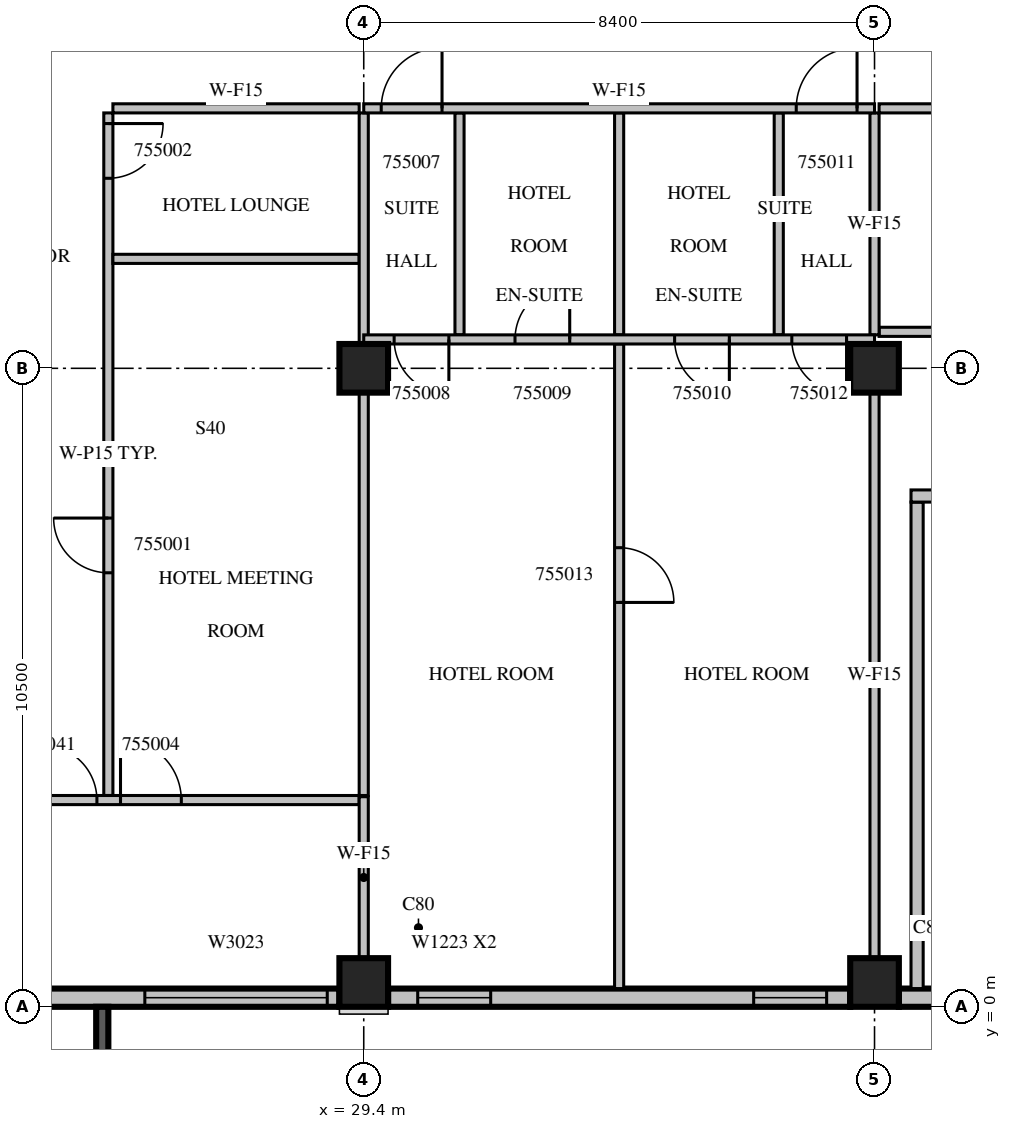
"""IFC4 building model, lengths in metres.
Left out: names, types, materials, properties, quantities, classifications, styles, units other than length and angle.
Written with IfcOpenShell. Run it as: python <this file> out.ifc"""

import sys

from ifc_helpers import new_model, si_unit, direction, frame, frame_2d, origin, origin_2d, place, context, subcontext, project, spatial, rectangle, extrude, source, transform, mapped, element, fill, save


model = new_model("IFC4")
c1 = context("Model", 3, precision=1e-05, world=origin(), true_north=direction((0.0, 1.0)))
c2 = subcontext(c1, "Body", "Model", "MODEL_VIEW")
j1 = project(units=[si_unit("LENGTHUNIT", "METRE"), si_unit("PLANEANGLEUNIT", "RADIAN")], contexts=[c1])
p1 = place(None, origin())
s1 = spatial("IfcSite", under=j1, at=p1, CompositionType="ELEMENT")
p2 = place(p1, origin())
s2 = spatial("IfcBuilding", under=s1, at=p2, CompositionType="ELEMENT")
p3 = place(p2, frame((0.0, 0.0, 242.4)))
s3 = spatial("IfcBuildingStorey", under=s2, at=p3, CompositionType="ELEMENT", Elevation=242.4)
m1 = source(origin(), c2, "Body", "SweptSolid", [
    extrude(rectangle(XDim=0.8, YDim=0.8, at=origin_2d()), origin(), (0.0, 0.0, 1.0), 3.8),
])
for number, where, z_axis, x_axis in (
    (1, (29.4, 0.4, 0.0), (0.0, 0.0, 1.0), (1.0, 0.0, 0.0)),
    (2, (37.8, 0.4, 0.0), (0.0, 0.0, 1.0), (1.0, 0.0, 0.0)),
    (3, (29.4, 10.5, 0.0), (0.0, 0.0, 1.0), (1.0, 0.0, 0.0)),
    (4, (37.8, 10.5, 0.0), (0.0, 0.0, 1.0), (1.0, 0.0, 0.0)),
):
    element("IfcColumn", number, at=place(p3, frame(where, z_axis=z_axis, x_axis=x_axis)), inside=s3, PredefinedType="COLUMN", context=c2, shape_type="MappedRepresentation", body=[
        mapped(m1, transform((0.0, 0.0, 0.0), scale=1.0)),
    ])
m2 = source(origin(), c2, "Body", "SweptSolid", [
    extrude(rectangle(XDim=7.6, YDim=0.3, at=frame_2d((3.8, 0.0))), origin(), (0.0, 0.0, 1.0), 3.4),
])
p4 = place(p3, frame((21.4, 0.15, 0.0), z_axis=(0.0, 0.0, 1.0), x_axis=(1.0, 0.0, 0.0)))
e5 = element("IfcWall", 5, at=p4, inside=s3, PredefinedType="STANDARD", context=c2, shape_type="MappedRepresentation", body=[
    mapped(m2, transform((0.0, 0.0, 0.0), scale=1.0)),
])
m3 = source(origin(), c2, "Body", "SweptSolid", [
    extrude(rectangle(XDim=3.0, YDim=2.3, at=frame_2d((1.5, 1.15))), frame((0.0, 0.16, 0.0), z_axis=(0.0, -1.0, 0.0), x_axis=(1.0, 0.0, 0.0)), (0.0, 0.0, 1.0), 0.32),
])
p5 = place(p4, frame((4.4, 0.0, 0.6)))
e6 = element("IfcOpeningElement", 6, at=p5, cuts=e5, PredefinedType="OPENING", context=c2, shape_type="MappedRepresentation", body=[
    mapped(m3, transform((0.0, 0.0, 0.0), scale=1.0)),
])
m4 = source(origin(), c2, "Body", "SweptSolid", [
    extrude(rectangle(XDim=1.0, YDim=2.1, at=frame_2d((0.5, 1.05))), frame((0.0, 0.16, 0.0), z_axis=(0.0, -1.0, 0.0), x_axis=(1.0, 0.0, 0.0)), (0.0, 0.0, 1.0), 0.32),
])
p6 = place(p4, frame((1.2, 0.0, 0.0)))
e7 = element("IfcOpeningElement", 7, at=p6, cuts=e5, PredefinedType="OPENING", context=c2, shape_type="MappedRepresentation", body=[
    mapped(m4, transform((0.0, 0.0, 0.0), scale=1.0)),
])
p7 = place(p3, frame((29.8, 0.15, 0.0), z_axis=(0.0, 0.0, 1.0), x_axis=(1.0, 0.0, 0.0)))
e8 = element("IfcWall", 8, at=p7, inside=s3, PredefinedType="STANDARD", context=c2, shape_type="MappedRepresentation", body=[
    mapped(m2, transform((0.0, 0.0, 0.0), scale=1.0)),
])
m5 = source(origin(), c2, "Body", "SweptSolid", [
    extrude(rectangle(XDim=1.2, YDim=2.3, at=frame_2d((0.6, 1.15))), frame((0.0, 0.16, 0.0), z_axis=(0.0, -1.0, 0.0), x_axis=(1.0, 0.0, 0.0)), (0.0, 0.0, 1.0), 0.32),
])
p8 = place(p7, frame((0.487, 0.0, 0.6)))
e9 = element("IfcOpeningElement", 9, at=p8, cuts=e8, PredefinedType="OPENING", context=c2, shape_type="MappedRepresentation", body=[
    mapped(m5, transform((0.0, 0.0, 0.0), scale=1.0)),
])
p9 = place(p7, frame((6.013, 0.0, 0.6)))
e10 = element("IfcOpeningElement", 10, at=p9, cuts=e8, PredefinedType="OPENING", context=c2, shape_type="MappedRepresentation", body=[
    mapped(m5, transform((0.0, 0.0, 0.0), scale=1.0)),
])
m6 = source(origin(), c2, "Body", "SweptSolid", [
    extrude(rectangle(XDim=2.0, YDim=0.3, at=frame_2d((1.0, 0.0))), origin(), (0.0, 0.0, 1.0), 3.4),
])
p10 = place(p3, frame((38.2, 0.15, 0.0), z_axis=(0.0, 0.0, 1.0), x_axis=(1.0, 0.0, 0.0)))
e11 = element("IfcWall", 11, at=p10, inside=s3, PredefinedType="STANDARD", context=c2, shape_type="MappedRepresentation", body=[
    mapped(m6, transform((0.0, 0.0, 0.0), scale=1.0)),
])
m7 = source(origin(), c2, "Body", "SweptSolid", [
    extrude(rectangle(XDim=3.9, YDim=0.2, at=frame_2d((1.95, 0.0))), origin(), (0.0, 0.0, 1.0), 3.39),
])
p11 = place(p3, frame((25.1, 0.0, 0.0), z_axis=(0.0, 0.0, 1.0), x_axis=(0.0, -1.0, 0.0)))
e12 = element("IfcWall", 12, at=p11, inside=s3, PredefinedType="SOLIDWALL", context=c2, shape_type="MappedRepresentation", body=[
    mapped(m7, transform((0.0, 0.0, 0.0), scale=1.0)),
])
m8 = source(origin(), c2, "Body", "SweptSolid", [
    extrude(rectangle(XDim=2.4, YDim=2.3, at=frame_2d((1.2, 1.15))), frame((0.0, 0.11, 0.0), z_axis=(0.0, -1.0, 0.0), x_axis=(1.0, 0.0, 0.0)), (0.0, 0.0, 1.0), 0.22),
])
p12 = place(p11, frame((0.75, 0.0, 0.6)))
e13 = element("IfcOpeningElement", 13, at=p12, cuts=e12, PredefinedType="OPENING", context=c2, shape_type="MappedRepresentation", body=[
    mapped(m8, transform((0.0, 0.0, 0.0), scale=1.0)),
])
m9 = source(origin(), c2, "Body", "SweptSolid", [
    extrude(rectangle(XDim=8.0, YDim=0.2, at=frame_2d((4.0, 0.0))), origin(), (0.0, 0.0, 1.0), 3.4),
])
p13 = place(p3, frame((38.5, 0.3, 0.0), z_axis=(0.0, 0.0, 1.0), x_axis=(0.0, 1.0, 0.0)))
e14 = element("IfcWall", 14, at=p13, inside=s3, PredefinedType="PARTITIONING", context=c2, shape_type="MappedRepresentation", body=[
    mapped(m9, transform((0.0, 0.0, 0.0), scale=1.0)),
])
m10 = source(origin(), c2, "Body", "SweptSolid", [
    extrude(rectangle(XDim=5.45, YDim=0.2, at=frame_2d((2.725, 0.0))), origin(), (0.0, 0.0, 1.0), 3.4),
])
p14 = place(p3, frame((38.4, 8.4, 0.0), z_axis=(0.0, 0.0, 1.0), x_axis=(1.0, 0.0, 0.0)))
e15 = element("IfcWall", 15, at=p14, inside=s3, PredefinedType="PARTITIONING", context=c2, shape_type="MappedRepresentation", body=[
    mapped(m10, transform((0.0, 0.0, 0.0), scale=1.0)),
])
m11 = source(origin(), c2, "Body", "SweptSolid", [
    extrude(rectangle(XDim=1.2, YDim=2.1, at=frame_2d((0.6, 1.05))), frame((0.0, 0.11, 0.0), z_axis=(0.0, -1.0, 0.0), x_axis=(1.0, 0.0, 0.0)), (0.0, 0.0, 1.0), 0.22),
])
p15 = place(p14, frame((0.4, 0.0, 0.0)))
e16 = element("IfcOpeningElement", 16, at=p15, cuts=e15, PredefinedType="OPENING", context=c2, shape_type="MappedRepresentation", body=[
    mapped(m11, transform((0.0, 0.0, 0.0), scale=1.0)),
])
m12 = source(origin(), c2, "Body", "SweptSolid", [
    extrude(rectangle(XDim=0.9, YDim=2.1, at=frame_2d((0.45, 1.05))), frame((0.0, 0.11, 0.0), z_axis=(0.0, -1.0, 0.0), x_axis=(1.0, 0.0, 0.0)), (0.0, 0.0, 1.0), 0.22),
])
p16 = place(p14, frame((3.25, 0.0, 0.0)))
e17 = element("IfcOpeningElement", 17, at=p16, cuts=e15, PredefinedType="OPENING", context=c2, shape_type="MappedRepresentation", body=[
    mapped(m12, transform((0.0, 0.0, 0.0), scale=1.0)),
])
m13 = source(origin(), c2, "Body", "SweptSolid", [
    extrude(rectangle(XDim=11.225, YDim=0.15, at=frame_2d((5.612, 0.0))), origin(), (0.0, 0.0, 1.0), 3.4),
])
p17 = place(p3, frame((25.2, 14.7, 0.0), z_axis=(0.0, 0.0, 1.0), x_axis=(0.0, -1.0, 0.0)))
e18 = element("IfcWall", 18, at=p17, inside=s3, PredefinedType="PARTITIONING", context=c2, shape_type="MappedRepresentation", body=[
    mapped(m13, transform((0.0, 0.0, 0.0), scale=1.0)),
])
m14 = source(origin(), c2, "Body", "SweptSolid", [
    extrude(rectangle(XDim=0.9, YDim=2.1, at=frame_2d((0.45, 1.05))), frame((0.0, 0.085, 0.0), z_axis=(0.0, -1.0, 0.0), x_axis=(1.0, 0.0, 0.0)), (0.0, 0.0, 1.0), 0.17),
])
p18 = place(p17, frame((6.662, 0.0, 0.0)))
e19 = element("IfcOpeningElement", 19, at=p18, cuts=e18, PredefinedType="OPENING", context=c2, shape_type="MappedRepresentation", body=[
    mapped(m14, transform((0.0, 0.0, 0.0), scale=1.0)),
])
p19 = place(p17, frame((0.175, 0.0, 0.0)))
e20 = element("IfcOpeningElement", 20, at=p19, cuts=e18, PredefinedType="OPENING", context=c2, shape_type="MappedRepresentation", body=[
    mapped(m14, transform((0.0, 0.0, 0.0), scale=1.0)),
])
m15 = source(origin(), c2, "Body", "SweptSolid", [
    extrude(rectangle(XDim=4.05, YDim=0.15, at=frame_2d((2.025, 0.0))), origin(), (0.0, 0.0, 1.0), 3.4),
])
for number, where, z_axis, x_axis in (
    (21, (29.325, 12.3, 0.0), (0.0, 0.0, 1.0), (-1.0, 0.0, 0.0)),
    (22, (29.325, 14.775, 0.0), (0.0, 0.0, 1.0), (-1.0, 0.0, 0.0)),
):
    element("IfcWall", number, at=place(p3, frame(where, z_axis=z_axis, x_axis=x_axis)), inside=s3, PredefinedType="PARTITIONING", context=c2, shape_type="MappedRepresentation", body=[
        mapped(m15, transform((0.0, 0.0, 0.0), scale=1.0)),
    ])
m16 = source(origin(), c2, "Body", "SweptSolid", [
    extrude(rectangle(XDim=6.626, YDim=0.15, at=frame_2d((3.313, 0.0))), origin(), (0.0, 0.0, 1.0), 3.4),
])
p20 = place(p3, frame((29.4, 3.475, 0.0), z_axis=(0.0, 0.0, 1.0), x_axis=(0.0, 1.0, 0.0)))
e23 = element("IfcWall", 23, at=p20, inside=s3, PredefinedType="PARTITIONING", context=c2, shape_type="MappedRepresentation", body=[
    mapped(m16, transform((0.0, 0.0, 0.0), scale=1.0)),
])
m17 = source(origin(), c2, "Body", "SweptSolid", [
    extrude(rectangle(XDim=3.801, YDim=0.15, at=frame_2d((1.901, 0.0))), origin(), (0.0, 0.0, 1.0), 3.4),
])
p21 = place(p3, frame((29.4, 10.899, 0.0), z_axis=(0.0, 0.0, 1.0), x_axis=(0.0, 1.0, 0.0)))
e24 = element("IfcWall", 24, at=p21, inside=s3, PredefinedType="PARTITIONING", context=c2, shape_type="MappedRepresentation", body=[
    mapped(m17, transform((0.0, 0.0, 0.0), scale=1.0)),
])
m18 = source(origin(), c2, "Body", "SweptSolid", [
    extrude(rectangle(XDim=7.525, YDim=0.15, at=frame_2d((3.763, 0.0))), origin(), (0.0, 0.0, 1.0), 3.4),
])
p22 = place(p3, frame((21.8, 3.4, 0.0), z_axis=(0.0, 0.0, 1.0), x_axis=(1.0, 0.0, 0.0)))
e25 = element("IfcWall", 25, at=p22, inside=s3, PredefinedType="PARTITIONING", context=c2, shape_type="MappedRepresentation", body=[
    mapped(m18, transform((0.0, 0.0, 0.0), scale=1.0)),
])
m19 = source(origin(), c2, "Body", "SweptSolid", [
    extrude(rectangle(XDim=1.0, YDim=2.1, at=frame_2d((0.5, 1.05))), frame((0.0, 0.085, 0.0), z_axis=(0.0, -1.0, 0.0), x_axis=(1.0, 0.0, 0.0)), (0.0, 0.0, 1.0), 0.17),
])
p23 = place(p22, frame((3.6, 0.0, 0.0)))
e26 = element("IfcOpeningElement", 26, at=p23, cuts=e25, PredefinedType="OPENING", context=c2, shape_type="MappedRepresentation", body=[
    mapped(m19, transform((0.0, 0.0, 0.0), scale=1.0)),
])
p24 = place(p22, frame((2.312, 0.0, 0.0)))
e27 = element("IfcOpeningElement", 27, at=p24, cuts=e25, PredefinedType="OPENING", context=c2, shape_type="MappedRepresentation", body=[
    mapped(m14, transform((0.0, 0.0, 0.0), scale=1.0)),
])
m20 = source(origin(), c2, "Body", "SweptSolid", [
    extrude(rectangle(XDim=6.45, YDim=0.15, at=frame_2d((3.225, 0.0))), origin(), (0.0, 0.0, 1.0), 3.4),
])
p25 = place(p3, frame((37.875, 11.1, 0.0), z_axis=(0.0, 0.0, 1.0), x_axis=(1.0, 0.0, 0.0)))
e28 = element("IfcWall", 28, at=p25, inside=s3, PredefinedType="PARTITIONING", context=c2, shape_type="MappedRepresentation", body=[
    mapped(m20, transform((0.0, 0.0, 0.0), scale=1.0)),
])
p26 = place(p3, frame((44.325, 14.775, 0.0), z_axis=(0.0, 0.0, 1.0), x_axis=(-1.0, 0.0, 0.0)))
e29 = element("IfcWall", 29, at=p26, inside=s3, PredefinedType="PARTITIONING", context=c2, shape_type="MappedRepresentation", body=[
    mapped(m20, transform((0.0, 0.0, 0.0), scale=1.0)),
])
p27 = place(p26, frame((2.812, 0.0, 0.0)))
e30 = element("IfcOpeningElement", 30, at=p27, cuts=e29, PredefinedType="OPENING", context=c2, shape_type="MappedRepresentation", body=[
    mapped(m14, transform((0.0, 0.0, 0.0), scale=1.0)),
])
p28 = place(p3, frame((33.6, 0.3, 0.0), z_axis=(0.0, 0.0, 1.0), x_axis=(0.0, 1.0, 0.0)))
e31 = element("IfcWall", 31, at=p28, inside=s3, PredefinedType="PARTITIONING", context=c2, shape_type="SweptSolid", body=[
    extrude(rectangle(XDim=10.6, YDim=0.15, at=frame_2d((5.3, 0.0))), origin(), (0.0, 0.0, 1.0), 3.4),
])
p29 = place(p28, frame((6.35, 0.0, 0.0)))
e32 = element("IfcOpeningElement", 32, at=p29, cuts=e31, PredefinedType="OPENING", context=c2, shape_type="MappedRepresentation", body=[
    mapped(m14, transform((0.0, 0.0, 0.0), scale=1.0)),
])
m21 = source(origin(), c2, "Body", "SweptSolid", [
    extrude(rectangle(XDim=3.65, YDim=0.15, at=frame_2d((1.825, 0.0))), origin(), (0.0, 0.0, 1.0), 3.4),
])
for number, where, z_axis, x_axis in (
    (33, (30.975, 11.05, 0.0), (0.0, 0.0, 1.0), (0.0, 1.0, 0.0)),
    (34, (33.6, 11.05, 0.0), (0.0, 0.0, 1.0), (0.0, 1.0, 0.0)),
    (35, (36.225, 11.05, 0.0), (0.0, 0.0, 1.0), (0.0, 1.0, 0.0)),
):
    element("IfcWall", number, at=place(p3, frame(where, z_axis=z_axis, x_axis=x_axis)), inside=s3, PredefinedType="PARTITIONING", context=c2, shape_type="MappedRepresentation", body=[
        mapped(m21, transform((0.0, 0.0, 0.0), scale=1.0)),
    ])
m22 = source(origin(), c2, "Body", "SweptSolid", [
    extrude(rectangle(XDim=2.656, YDim=0.15, at=frame_2d((1.328, 0.0))), origin(), (0.0, 0.0, 1.0), 3.4),
])
p30 = place(p3, frame((29.4, 0.799, 0.0), z_axis=(0.0, 0.0, 1.0), x_axis=(0.0, 1.0, 0.0)))
e36 = element("IfcWall", 36, at=p30, inside=s3, PredefinedType="PARTITIONING", context=c2, shape_type="MappedRepresentation", body=[
    mapped(m22, transform((0.0, 0.0, 0.0), scale=1.0)),
])
m23 = source(origin(), c2, "Body", "SweptSolid", [
    extrude(rectangle(XDim=9.302, YDim=0.15, at=frame_2d((4.651, 0.0))), origin(), (0.0, 0.0, 1.0), 3.4),
])
p31 = place(p3, frame((37.8, 0.799, 0.0), z_axis=(0.0, 0.0, 1.0), x_axis=(0.0, 1.0, 0.0)))
e37 = element("IfcWall", 37, at=p31, inside=s3, PredefinedType="PARTITIONING", context=c2, shape_type="MappedRepresentation", body=[
    mapped(m23, transform((0.0, 0.0, 0.0), scale=1.0)),
])
p32 = place(p3, frame((37.8, 11.05, 0.0), z_axis=(0.0, 0.0, 1.0), x_axis=(0.0, 1.0, 0.0)))
e38 = element("IfcWall", 38, at=p32, inside=s3, PredefinedType="PARTITIONING", context=c2, shape_type="MappedRepresentation", body=[
    mapped(m21, transform((0.0, 0.0, 0.0), scale=1.0)),
])
m24 = source(origin(), c2, "Body", "SweptSolid", [
    extrude(rectangle(XDim=8.4, YDim=0.15, at=frame_2d((4.2, 0.0))), origin(), (0.0, 0.0, 1.0), 3.4),
])
p33 = place(p3, frame((37.8, 10.975, 0.0), z_axis=(0.0, 0.0, 1.0), x_axis=(-1.0, 0.0, 0.0)))
e39 = element("IfcWall", 39, at=p33, inside=s3, PredefinedType="PARTITIONING", context=c2, shape_type="MappedRepresentation", body=[
    mapped(m24, transform((0.0, 0.0, 0.0), scale=1.0)),
])
p34 = place(p33, frame((7.0, 0.0, 0.0)))
e40 = element("IfcOpeningElement", 40, at=p34, cuts=e39, PredefinedType="OPENING", context=c2, shape_type="MappedRepresentation", body=[
    mapped(m14, transform((0.0, 0.0, 0.0), scale=1.0)),
])
p35 = place(p33, frame((5.013, 0.0, 0.0)))
e41 = element("IfcOpeningElement", 41, at=p35, cuts=e39, PredefinedType="OPENING", context=c2, shape_type="MappedRepresentation", body=[
    mapped(m14, transform((0.0, 0.0, 0.0), scale=1.0)),
])
p36 = place(p33, frame((2.388, 0.0, 0.0)))
e42 = element("IfcOpeningElement", 42, at=p36, cuts=e39, PredefinedType="OPENING", context=c2, shape_type="MappedRepresentation", body=[
    mapped(m14, transform((0.0, 0.0, 0.0), scale=1.0)),
])
p37 = place(p33, frame((0.46, 0.0, 0.0)))
e43 = element("IfcOpeningElement", 43, at=p37, cuts=e39, PredefinedType="OPENING", context=c2, shape_type="MappedRepresentation", body=[
    mapped(m14, transform((0.0, 0.0, 0.0), scale=1.0)),
])
p38 = place(p3, frame((37.8, 14.775, 0.0), z_axis=(0.0, 0.0, 1.0), x_axis=(-1.0, 0.0, 0.0)))
e44 = element("IfcWall", 44, at=p38, inside=s3, PredefinedType="PARTITIONING", context=c2, shape_type="MappedRepresentation", body=[
    mapped(m24, transform((0.0, 0.0, 0.0), scale=1.0)),
])
p39 = place(p38, frame((7.112, 0.0, 0.0)))
e45 = element("IfcOpeningElement", 45, at=p39, cuts=e44, PredefinedType="OPENING", context=c2, shape_type="MappedRepresentation", body=[
    mapped(m19, transform((0.0, 0.0, 0.0), scale=1.0)),
])
p40 = place(p38, frame((0.287, 0.0, 0.0)))
e46 = element("IfcOpeningElement", 46, at=p40, cuts=e44, PredefinedType="OPENING", context=c2, shape_type="MappedRepresentation", body=[
    mapped(m19, transform((0.0, 0.0, 0.0), scale=1.0)),
])
m25 = source(origin(), c2, "Body", "SweptSolid", [
    extrude(rectangle(XDim=3.0, YDim=2.3, at=frame_2d((1.5, 1.15))), frame((0.0, 0.03, 0.0), z_axis=(0.0, -1.0, 0.0), x_axis=(1.0, 0.0, 0.0)), (0.0, 0.0, 1.0), 0.06),
])
p41 = place(p5, origin())
e47 = element("IfcWindow", 47, at=p41, inside=s3, PartitioningType="SINGLE_PANEL", PredefinedType="WINDOW", context=c2, shape_type="MappedRepresentation", body=[
    mapped(m25, transform((0.0, 0.0, 0.0), scale=1.0)),
])
fill(e6, e47)
m26 = source(origin(), c2, "Body", "SweptSolid", [
    extrude(rectangle(XDim=1.2, YDim=2.3, at=frame_2d((0.6, 1.15))), frame((0.0, 0.03, 0.0), z_axis=(0.0, -1.0, 0.0), x_axis=(1.0, 0.0, 0.0)), (0.0, 0.0, 1.0), 0.06),
])
p42 = place(p8, origin())
e48 = element("IfcWindow", 48, at=p42, inside=s3, PartitioningType="SINGLE_PANEL", PredefinedType="WINDOW", context=c2, shape_type="MappedRepresentation", body=[
    mapped(m26, transform((0.0, 0.0, 0.0), scale=1.0)),
])
fill(e9, e48)
p43 = place(p9, origin())
e49 = element("IfcWindow", 49, at=p43, inside=s3, PartitioningType="SINGLE_PANEL", PredefinedType="WINDOW", context=c2, shape_type="MappedRepresentation", body=[
    mapped(m26, transform((0.0, 0.0, 0.0), scale=1.0)),
])
fill(e10, e49)
m27 = source(origin(), c2, "Body", "SweptSolid", [
    extrude(rectangle(XDim=0.9, YDim=2.1, at=frame_2d((0.45, 1.05))), frame((0.0, 0.025, 0.0), z_axis=(0.0, -1.0, 0.0), x_axis=(1.0, 0.0, 0.0)), (0.0, 0.0, 1.0), 0.05),
])
p44 = place(p18, origin())
e50 = element("IfcDoor", 50, at=p44, inside=s3, OperationType="SINGLE_SWING_RIGHT", PredefinedType="DOOR", context=c2, shape_type="MappedRepresentation", body=[
    mapped(m27, transform((0.0, 0.0, 0.0), scale=1.0)),
])
fill(e19, e50)
p45 = place(p19, origin())
e51 = element("IfcDoor", 51, at=p45, inside=s3, OperationType="SINGLE_SWING_LEFT", PredefinedType="DOOR", context=c2, shape_type="MappedRepresentation", body=[
    mapped(m27, transform((0.0, 0.0, 0.0), scale=1.0)),
])
fill(e20, e51)
m28 = source(origin(), c2, "Body", "SweptSolid", [
    extrude(rectangle(XDim=1.0, YDim=2.1, at=frame_2d((0.5, 1.05))), frame((0.0, 0.025, 0.0), z_axis=(0.0, -1.0, 0.0), x_axis=(1.0, 0.0, 0.0)), (0.0, 0.0, 1.0), 0.05),
])
p46 = place(p23, origin())
e52 = element("IfcDoor", 52, at=p46, inside=s3, OperationType="SINGLE_SWING_LEFT", PredefinedType="DOOR", context=c2, shape_type="MappedRepresentation", body=[
    mapped(m28, transform((0.0, 0.0, 0.0), scale=1.0)),
])
fill(e26, e52)
p47 = place(p39, origin())
e53 = element("IfcDoor", 53, at=p47, inside=s3, OperationType="SINGLE_SWING_RIGHT", PredefinedType="DOOR", context=c2, shape_type="MappedRepresentation", body=[
    mapped(m28, transform((0.0, 0.0, 0.0), scale=1.0)),
])
fill(e45, e53)
p48 = place(p34, origin())
e54 = element("IfcDoor", 54, at=p48, inside=s3, OperationType="SINGLE_SWING_LEFT", PredefinedType="DOOR", context=c2, shape_type="MappedRepresentation", body=[
    mapped(m27, transform((0.0, 0.0, 0.0), scale=1.0)),
])
fill(e40, e54)
p49 = place(p35, origin())
e55 = element("IfcDoor", 55, at=p49, inside=s3, OperationType="SINGLE_SWING_RIGHT", PredefinedType="DOOR", context=c2, shape_type="MappedRepresentation", body=[
    mapped(m27, transform((0.0, 0.0, 0.0), scale=1.0)),
])
fill(e41, e55)
p50 = place(p36, origin())
e56 = element("IfcDoor", 56, at=p50, inside=s3, OperationType="SINGLE_SWING_LEFT", PredefinedType="DOOR", context=c2, shape_type="MappedRepresentation", body=[
    mapped(m27, transform((0.0, 0.0, 0.0), scale=1.0)),
])
fill(e42, e56)
p51 = place(p40, origin())
e57 = element("IfcDoor", 57, at=p51, inside=s3, OperationType="SINGLE_SWING_RIGHT", PredefinedType="DOOR", context=c2, shape_type="MappedRepresentation", body=[
    mapped(m28, transform((0.0, 0.0, 0.0), scale=1.0)),
])
fill(e46, e57)
p52 = place(p37, origin())
e58 = element("IfcDoor", 58, at=p52, inside=s3, OperationType="SINGLE_SWING_LEFT", PredefinedType="DOOR", context=c2, shape_type="MappedRepresentation", body=[
    mapped(m27, transform((0.0, 0.0, 0.0), scale=1.0)),
])
fill(e43, e58)
p53 = place(p29, origin())
e59 = element("IfcDoor", 59, at=p53, inside=s3, OperationType="SINGLE_SWING_RIGHT", PredefinedType="DOOR", context=c2, shape_type="MappedRepresentation", body=[
    mapped(m27, transform((0.0, 0.0, 0.0), scale=1.0)),
])
fill(e32, e59)
p54 = place(p24, origin())
e60 = element("IfcDoor", 60, at=p54, inside=s3, OperationType="SINGLE_SWING_LEFT", PredefinedType="DOOR", context=c2, shape_type="MappedRepresentation", body=[
    mapped(m27, transform((0.0, 0.0, 0.0), scale=1.0)),
])
fill(e27, e60)
save(model, sys.argv[1])
